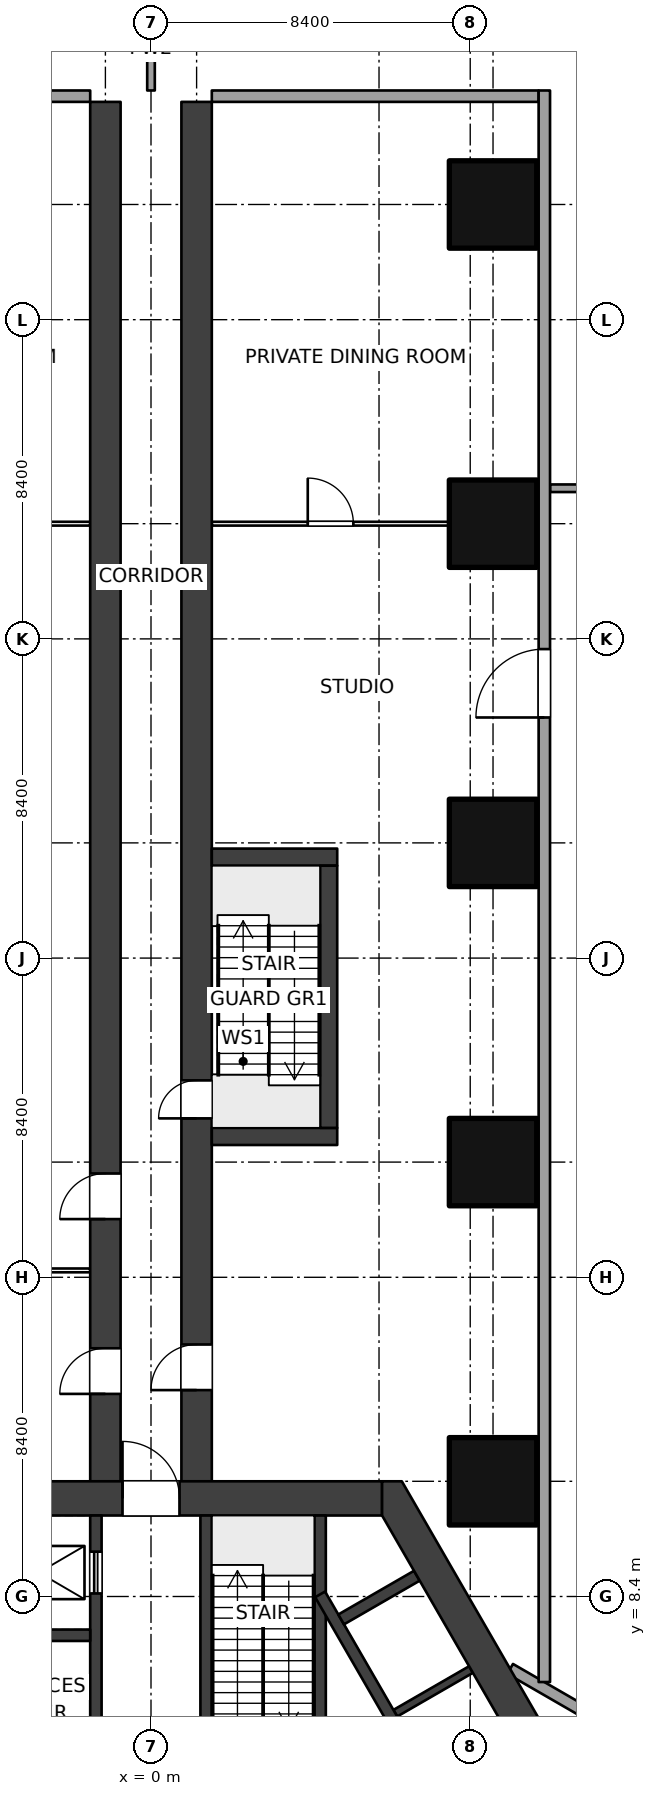
"""IFC4 building model, lengths in metres.
Left out: names, types, materials, properties, quantities, classifications, styles, units other than length and angle.
Written with IfcOpenShell. Run it as: python <this file> out.ifc"""

import sys

from ifc_helpers import new_model, si_unit, direction, frame, frame_2d, origin, origin_2d, place, context, subcontext, project, spatial, polyline, rectangle, outline, extrude, element, fill, save


model = new_model("IFC4")
c1 = context("Model", 3, precision=1e-05, world=origin(), true_north=direction((0.0, 1.0)))
c2 = subcontext(c1, "Body", "Model", "MODEL_VIEW")
j1 = project(units=[si_unit("LENGTHUNIT", "METRE"), si_unit("PLANEANGLEUNIT", "RADIAN")], contexts=[c1])
p1 = place(None, origin())
s1 = spatial("IfcSite", under=j1, at=p1, CompositionType="ELEMENT")
p2 = place(p1, origin())
s2 = spatial("IfcBuilding", under=s1, at=p2, CompositionType="ELEMENT")
p3 = place(p2, frame((0.0, 0.0, 21.0)))
s3 = spatial("IfcBuildingStorey", under=s2, at=p3, CompositionType="ELEMENT", Elevation=21.0)
for number, where, z_axis, x_axis in (
    (1, (9.0, 11.432, 0.0), (0.0, 0.0, 1.0), (1.0, 0.0, 0.0)),
    (2, (9.0, 19.832, 0.0), (0.0, 0.0, 1.0), (1.0, 0.0, 0.0)),
    (3, (9.0, 28.231, 0.0), (0.0, 0.0, 1.0), (1.0, 0.0, 0.0)),
    (4, (9.0, 36.632, 0.0), (0.0, 0.0, 1.0), (1.0, 0.0, 0.0)),
    (5, (9.0, 45.031, 0.0), (0.0, 0.0, 1.0), (1.0, 0.0, 0.0)),
):
    element("IfcColumn", number, at=place(p3, frame(where, z_axis=z_axis, x_axis=x_axis)), inside=s3, PredefinedType="COLUMN", context=c2, shape_type="SweptSolid", body=[
        extrude(rectangle(XDim=2.3, YDim=2.3, at=origin_2d()), origin(), (0.0, 0.0, 1.0), 5.0),
    ])
p4 = place(p3, frame((-6.08, 10.981, 0.0), z_axis=(0.0, 0.0, 1.0), x_axis=(1.0, 0.0, 0.0)))
e6 = element("IfcWall", 6, at=p4, inside=s3, PredefinedType="SHEAR", context=c2, shape_type="SweptSolid", body=[
    extrude(rectangle(XDim=12.161, YDim=0.9, at=frame_2d((6.08, 0.0))), origin(), (0.0, 0.0, 1.0), 5.0),
])
p5 = place(p4, frame((5.33, 0.0, 0.0)))
e7 = element("IfcOpeningElement", 7, at=p5, cuts=e6, PredefinedType="OPENING", context=c2, shape_type="SweptSolid", body=[
    extrude(rectangle(XDim=1.5, YDim=2.1, at=frame_2d((0.75, 1.05))), frame((0.0, 0.46, 0.0), z_axis=(0.0, -1.0, 0.0), x_axis=(1.0, 0.0, 0.0)), (0.0, 0.0, 1.0), 0.92),
])
p6 = place(p3, origin())
e8 = element("IfcWall", 8, at=p6, inside=s3, PredefinedType="SHEAR", context=c2, shape_type="SweptSolid", body=[
    extrude(outline(polyline([(13.2, 0.0), (6.6, 11.432), (6.08, 11.432), (6.08, 10.531), (12.161, 0.0), (12.94, -0.45), (13.2, 0.0)])), origin(), (0.0, 0.0, 1.0), 5.0),
])
p7 = place(p3, frame((1.45, 3.63, 0.0), z_axis=(0.0, 0.0, 1.0), x_axis=(0.0, 1.0, 0.0)))
e9 = element("IfcWall", 9, at=p7, inside=s3, PredefinedType="SHEAR", context=c2, shape_type="SweptSolid", body=[
    extrude(rectangle(XDim=6.902, YDim=0.3, at=frame_2d((3.451, 0.0))), origin(), (0.0, 0.0, 1.0), 5.0),
])
p8 = place(p7, frame((0.25, 0.0, 0.0)))
e10 = element("IfcOpeningElement", 10, at=p8, cuts=e9, PredefinedType="OPENING", context=c2, shape_type="SweptSolid", body=[
    extrude(rectangle(XDim=1.0, YDim=2.1, at=frame_2d((0.5, 1.05))), frame((0.0, 0.16, 0.0), z_axis=(0.0, -1.0, 0.0), x_axis=(1.0, 0.0, 0.0)), (0.0, 0.0, 1.0), 0.32),
])
p9 = place(p3, frame((4.45, 3.63, 0.0), z_axis=(0.0, 0.0, 1.0), x_axis=(0.0, 1.0, 0.0)))
e11 = element("IfcWall", 11, at=p9, inside=s3, PredefinedType="SHEAR", context=c2, shape_type="SweptSolid", body=[
    extrude(rectangle(XDim=6.902, YDim=0.3, at=frame_2d((3.451, 0.0))), origin(), (0.0, 0.0, 1.0), 5.0),
])
p10 = place(p3, frame((-1.45, 3.63, 0.0), z_axis=(0.0, 0.0, 1.0), x_axis=(0.0, 1.0, 0.0)))
e12 = element("IfcWall", 12, at=p10, inside=s3, PredefinedType="SHEAR", context=c2, shape_type="SweptSolid", body=[
    extrude(rectangle(XDim=6.902, YDim=0.3, at=frame_2d((3.451, 0.0))), origin(), (0.0, 0.0, 1.0), 5.0),
])
p11 = place(p10, frame((4.85, 0.0, 0.0)))
e13 = element("IfcOpeningElement", 13, at=p11, cuts=e12, PredefinedType="OPENING", context=c2, shape_type="SweptSolid", body=[
    extrude(rectangle(XDim=1.1, YDim=2.1, at=frame_2d((0.55, 1.05))), frame((0.0, 0.16, 0.0), z_axis=(0.0, -1.0, 0.0), x_axis=(1.0, 0.0, 0.0)), (0.0, 0.0, 1.0), 0.32),
])
p12 = place(p3, frame((-4.3, 7.38, 0.0), z_axis=(0.0, 0.0, 1.0), x_axis=(1.0, 0.0, 0.0)))
e14 = element("IfcWall", 14, at=p12, inside=s3, PredefinedType="SHEAR", context=c2, shape_type="SweptSolid", body=[
    extrude(rectangle(XDim=2.7, YDim=0.3, at=frame_2d((1.35, 0.0))), origin(), (0.0, 0.0, 1.0), 5.0),
])
p13 = place(p3, frame((4.45, 8.455, 0.0), z_axis=(0.0, 0.0, 1.0), x_axis=(0.500002290144, -0.866024081565, 0.0)))
e15 = element("IfcWall", 15, at=p13, inside=s3, PredefinedType="SHEAR", context=c2, shape_type="SweptSolid", body=[
    extrude(rectangle(XDim=10.195, YDim=0.3, at=frame_2d((5.098, 0.0))), origin(), (0.0, 0.0, 1.0), 5.0),
])
p14 = place(p3, frame((5.004, 7.796, 0.0), z_axis=(0.0, 0.0, 1.0), x_axis=(0.866053019151, 0.499952165731, 0.0)))
e16 = element("IfcWall", 16, at=p14, inside=s3, PredefinedType="SHEAR", context=c2, shape_type="SweptSolid", body=[
    extrude(rectangle(XDim=2.3, YDim=0.3, at=frame_2d((1.15, 0.0))), origin(), (0.0, 0.0, 1.0), 5.0),
])
p15 = place(p3, frame((6.429, 5.328, 0.0), z_axis=(0.0, 0.0, 1.0), x_axis=(0.866007057882, 0.500031774688, 0.0)))
e17 = element("IfcWall", 17, at=p15, inside=s3, PredefinedType="SHEAR", context=c2, shape_type="SweptSolid", body=[
    extrude(rectangle(XDim=2.3, YDim=0.2, at=frame_2d((1.15, 0.0))), origin(), (0.0, 0.0, 1.0), 5.0),
])
p16 = place(p3, frame((-1.2, 10.981, 0.0), z_axis=(0.0, 0.0, 1.0), x_axis=(0.0, 1.0, 0.0)))
e18 = element("IfcWall", 18, at=p16, inside=s3, PredefinedType="SHEAR", context=c2, shape_type="SweptSolid", body=[
    extrude(rectangle(XDim=36.75, YDim=0.8, at=frame_2d((18.375, 0.0))), origin(), (0.0, 0.0, 1.0), 5.0),
])
p17 = place(p16, frame((2.75, 0.0, 0.0)))
e19 = element("IfcOpeningElement", 19, at=p17, cuts=e18, PredefinedType="OPENING", context=c2, shape_type="SweptSolid", body=[
    extrude(rectangle(XDim=1.2, YDim=2.1, at=frame_2d((0.6, 1.05))), frame((0.0, 0.41, 0.0), z_axis=(0.0, -1.0, 0.0), x_axis=(1.0, 0.0, 0.0)), (0.0, 0.0, 1.0), 0.82),
])
p18 = place(p16, frame((7.35, 0.0, 0.0)))
e20 = element("IfcOpeningElement", 20, at=p18, cuts=e18, PredefinedType="OPENING", context=c2, shape_type="SweptSolid", body=[
    extrude(rectangle(XDim=1.2, YDim=2.1, at=frame_2d((0.6, 1.05))), frame((0.0, 0.41, 0.0), z_axis=(0.0, -1.0, 0.0), x_axis=(1.0, 0.0, 0.0)), (0.0, 0.0, 1.0), 0.82),
])
p19 = place(p3, frame((1.2, 10.981, 0.0), z_axis=(0.0, 0.0, 1.0), x_axis=(0.0, 1.0, 0.0)))
e21 = element("IfcWall", 21, at=p19, inside=s3, PredefinedType="SHEAR", context=c2, shape_type="SweptSolid", body=[
    extrude(rectangle(XDim=36.75, YDim=0.8, at=frame_2d((18.375, 0.0))), origin(), (0.0, 0.0, 1.0), 5.0),
])
p20 = place(p19, frame((10.0, 0.0, 0.0)))
e22 = element("IfcOpeningElement", 22, at=p20, cuts=e21, PredefinedType="OPENING", context=c2, shape_type="SweptSolid", body=[
    extrude(rectangle(XDim=1.0, YDim=2.1, at=frame_2d((0.5, 1.05))), frame((0.0, 0.41, 0.0), z_axis=(0.0, -1.0, 0.0), x_axis=(1.0, 0.0, 0.0)), (0.0, 0.0, 1.0), 0.82),
])
p21 = place(p19, frame((2.85, 0.0, 0.0)))
e23 = element("IfcOpeningElement", 23, at=p21, cuts=e21, PredefinedType="OPENING", context=c2, shape_type="SweptSolid", body=[
    extrude(rectangle(XDim=1.2, YDim=2.1, at=frame_2d((0.6, 1.05))), frame((0.0, 0.41, 0.0), z_axis=(0.0, -1.0, 0.0), x_axis=(1.0, 0.0, 0.0)), (0.0, 0.0, 1.0), 0.82),
])
p22 = place(p3, frame((-1.6, 16.981, 0.0), z_axis=(0.0, 0.0, 1.0), x_axis=(-1.0, 0.0, 0.0)))
e24 = element("IfcWall", 24, at=p22, inside=s3, PredefinedType="PARTITIONING", context=c2, shape_type="SweptSolid", body=[
    extrude(rectangle(XDim=3.15, YDim=0.1, at=frame_2d((1.575, 0.0))), origin(), (0.0, 0.0, 1.0), 4.6),
])
p23 = place(p3, frame((-1.6, 36.632, 0.0), z_axis=(0.0, 0.0, 1.0), x_axis=(-1.0, 0.0, 0.0)))
e25 = element("IfcWall", 25, at=p23, inside=s3, PredefinedType="PARTITIONING", context=c2, shape_type="SweptSolid", body=[
    extrude(rectangle(XDim=6.25, YDim=0.1, at=frame_2d((3.125, 0.0))), origin(), (0.0, 0.0, 1.0), 2.8),
])
p24 = place(p23, frame((2.525, 0.0, 0.0)))
e26 = element("IfcOpeningElement", 26, at=p24, cuts=e25, PredefinedType="OPENING", context=c2, shape_type="SweptSolid", body=[
    extrude(rectangle(XDim=1.2, YDim=2.1, at=frame_2d((0.6, 1.05))), frame((0.0, 0.06, 0.0), z_axis=(0.0, -1.0, 0.0), x_axis=(1.0, 0.0, 0.0)), (0.0, 0.0, 1.0), 0.12),
])
p25 = place(p3, frame((1.6, 36.632, 0.0), z_axis=(0.0, 0.0, 1.0), x_axis=(1.0, 0.0, 0.0)))
e27 = element("IfcWall", 27, at=p25, inside=s3, PredefinedType="PARTITIONING", context=c2, shape_type="SweptSolid", body=[
    extrude(rectangle(XDim=6.25, YDim=0.1, at=frame_2d((3.125, 0.0))), origin(), (0.0, 0.0, 1.0), 2.8),
])
p26 = place(p25, frame((2.525, 0.0, 0.0)))
e28 = element("IfcOpeningElement", 28, at=p26, cuts=e27, PredefinedType="OPENING", context=c2, shape_type="SweptSolid", body=[
    extrude(rectangle(XDim=1.2, YDim=2.1, at=frame_2d((0.6, 1.05))), frame((0.0, 0.06, 0.0), z_axis=(0.0, -1.0, 0.0), x_axis=(1.0, 0.0, 0.0)), (0.0, 0.0, 1.0), 0.12),
])
p27 = place(p3, frame((0.0, 48.031, 0.0), z_axis=(0.0, 0.0, 1.0), x_axis=(0.0, 1.0, 0.0)))
e29 = element("IfcWall", 29, at=p27, inside=s3, PredefinedType="SOLIDWALL", context=c2, shape_type="SweptSolid", body=[
    extrude(rectangle(XDim=2.176, YDim=0.2, at=frame_2d((1.088, 0.0))), origin(), (0.0, 0.0, 1.0), 4.6),
])
p28 = place(p3, frame((10.5, 37.564, 0.0), z_axis=(0.0, 0.0, 1.0), x_axis=(1.0, 0.0, 0.0)))
e30 = element("IfcWall", 30, at=p28, inside=s3, PredefinedType="SOLIDWALL", context=c2, shape_type="SweptSolid", body=[
    extrude(rectangle(XDim=39.737, YDim=0.2, at=frame_2d((19.869, 0.0))), origin(), (0.0, 0.0, 1.0), 4.6),
])
p29 = place(p28, frame((18.0, 0.0, 0.0)))
e31 = element("IfcOpeningElement", 31, at=p29, cuts=e30, PredefinedType="OPENING", context=c2, shape_type="SweptSolid", body=[
    extrude(rectangle(XDim=1.8, YDim=2.4, at=frame_2d((0.9, 1.2))), frame((0.0, 0.11, 0.0), z_axis=(0.0, -1.0, 0.0), x_axis=(1.0, 0.0, 0.0)), (0.0, 0.0, 1.0), 0.22),
])
for number, where, z_axis, x_axis in (
    (32, (-1.6, 47.882, 0.0), (0.0, 0.0, 1.0), (-1.0, 0.0, 0.0)),
    (33, (1.6, 47.882, 0.0), (0.0, 0.0, 1.0), (1.0, 0.0, 0.0)),
):
    element("IfcWall", number, at=place(p3, frame(where, z_axis=z_axis, x_axis=x_axis)), inside=s3, PredefinedType="SOLIDWALL", context=c2, shape_type="SweptSolid", body=[
        extrude(rectangle(XDim=8.6, YDim=0.3, at=frame_2d((4.3, 0.0))), origin(), (0.0, 0.0, 1.0), 3.0),
    ])
p30 = place(p3, frame((10.35, 6.149, 0.0), z_axis=(0.0, 0.0, 1.0), x_axis=(0.0, 1.0, 0.0)))
e34 = element("IfcWall", 34, at=p30, inside=s3, PredefinedType="SOLIDWALL", context=c2, shape_type="SweptSolid", body=[
    extrude(rectangle(XDim=41.883, YDim=0.3, at=frame_2d((20.941, 0.0))), origin(), (0.0, 0.0, 1.0), 4.6),
])
p31 = place(p30, frame((25.383, 0.0, 0.0)))
e35 = element("IfcOpeningElement", 35, at=p31, cuts=e34, PredefinedType="OPENING", context=c2, shape_type="SweptSolid", body=[
    extrude(rectangle(XDim=1.8, YDim=2.4, at=frame_2d((0.9, 1.2))), frame((0.0, 0.16, 0.0), z_axis=(0.0, -1.0, 0.0), x_axis=(1.0, 0.0, 0.0)), (0.0, 0.0, 1.0), 0.32),
])
p32 = place(p3, frame((9.45, 6.495, 0.0), z_axis=(0.0, 0.0, 1.0), x_axis=(0.866027750123, -0.499995936, 0.0)))
e36 = element("IfcWall", 36, at=p32, inside=s3, PredefinedType="SOLIDWALL", context=c2, shape_type="SweptSolid", body=[
    extrude(rectangle(XDim=29.39, YDim=0.3, at=frame_2d((14.695, 0.0))), origin(), (0.0, 0.0, 1.0), 4.6),
])
p33 = place(p32, frame((18.195, 0.0, 0.0)))
e37 = element("IfcOpeningElement", 37, at=p33, cuts=e36, PredefinedType="OPENING", context=c2, shape_type="SweptSolid", body=[
    extrude(rectangle(XDim=1.8, YDim=2.4, at=frame_2d((0.9, 1.2))), frame((0.0, 0.16, 0.0), z_axis=(0.0, -1.0, 0.0), x_axis=(1.0, 0.0, 0.0)), (0.0, 0.0, 1.0), 0.32),
])
for number, where, z_axis, x_axis in (
    (38, (1.6, 20.507, 0.0), (0.0, 0.0, 1.0), (1.0, 0.0, 0.0)),
    (39, (1.6, 27.856, 0.0), (0.0, 0.0, 1.0), (1.0, 0.0, 0.0)),
):
    element("IfcWall", number, at=place(p3, frame(where, z_axis=z_axis, x_axis=x_axis)), inside=s3, PredefinedType="SOLIDWALL", context=c2, shape_type="SweptSolid", body=[
        extrude(rectangle(XDim=3.3, YDim=0.45, at=frame_2d((1.65, 0.0))), origin(), (0.0, 0.0, 1.0), 5.0),
    ])
p34 = place(p3, frame((4.675, 20.731, 0.0), z_axis=(0.0, 0.0, 1.0), x_axis=(0.0, 1.0, 0.0)))
e40 = element("IfcWall", 40, at=p34, inside=s3, PredefinedType="SOLIDWALL", context=c2, shape_type="SweptSolid", body=[
    extrude(rectangle(XDim=6.9, YDim=0.45, at=frame_2d((3.45, 0.0))), origin(), (0.0, 0.0, 1.0), 5.0),
])
p35 = place(p11, origin())
e41 = element("IfcDoor", 41, at=p35, inside=s3, OperationType="DOUBLE_DOOR_SLIDING", PredefinedType="DOOR", context=c2, shape_type="SweptSolid", body=[
    extrude(rectangle(XDim=1.1, YDim=2.1, at=frame_2d((0.55, 1.05))), frame((0.0, 0.025, 0.0), z_axis=(0.0, -1.0, 0.0), x_axis=(1.0, 0.0, 0.0)), (0.0, 0.0, 1.0), 0.05),
])
fill(e13, e41)
p36 = place(p5, origin())
e42 = element("IfcDoor", 42, at=p36, inside=s3, OperationType="DOUBLE_DOOR_DOUBLE_SWING", PredefinedType="DOOR", context=c2, shape_type="SweptSolid", body=[
    extrude(rectangle(XDim=1.5, YDim=2.1, at=frame_2d((0.75, 1.05))), frame((0.0, 0.025, 0.0), z_axis=(0.0, -1.0, 0.0), x_axis=(1.0, 0.0, 0.0)), (0.0, 0.0, 1.0), 0.05),
])
fill(e7, e42)
p37 = place(p20, origin())
e43 = element("IfcDoor", 43, at=p37, inside=s3, OperationType="SINGLE_SWING_LEFT", PredefinedType="DOOR", context=c2, shape_type="SweptSolid", body=[
    extrude(rectangle(XDim=1.0, YDim=2.1, at=frame_2d((0.5, 1.05))), frame((0.0, 0.025, 0.0), z_axis=(0.0, -1.0, 0.0), x_axis=(1.0, 0.0, 0.0)), (0.0, 0.0, 1.0), 0.05),
])
fill(e22, e43)
p38 = place(p17, origin())
e44 = element("IfcDoor", 44, at=p38, inside=s3, OperationType="DOUBLE_SWING_LEFT", PredefinedType="DOOR", context=c2, shape_type="SweptSolid", body=[
    extrude(rectangle(XDim=1.2, YDim=2.1, at=frame_2d((0.6, 1.05))), frame((0.0, 0.025, 0.0), z_axis=(0.0, -1.0, 0.0), x_axis=(1.0, 0.0, 0.0)), (0.0, 0.0, 1.0), 0.05),
])
fill(e19, e44)
p39 = place(p18, origin())
e45 = element("IfcDoor", 45, at=p39, inside=s3, OperationType="DOUBLE_SWING_LEFT", PredefinedType="DOOR", context=c2, shape_type="SweptSolid", body=[
    extrude(rectangle(XDim=1.2, YDim=2.1, at=frame_2d((0.6, 1.05))), frame((0.0, 0.025, 0.0), z_axis=(0.0, -1.0, 0.0), x_axis=(1.0, 0.0, 0.0)), (0.0, 0.0, 1.0), 0.05),
])
fill(e20, e45)
p40 = place(p26, origin())
e46 = element("IfcDoor", 46, at=p40, inside=s3, OperationType="DOUBLE_SWING_LEFT", PredefinedType="DOOR", context=c2, shape_type="SweptSolid", body=[
    extrude(rectangle(XDim=1.2, YDim=2.1, at=frame_2d((0.6, 1.05))), frame((0.0, 0.025, 0.0), z_axis=(0.0, -1.0, 0.0), x_axis=(1.0, 0.0, 0.0)), (0.0, 0.0, 1.0), 0.05),
])
fill(e28, e46)
p41 = place(p21, origin())
e47 = element("IfcDoor", 47, at=p41, inside=s3, OperationType="DOUBLE_SWING_LEFT", PredefinedType="DOOR", context=c2, shape_type="SweptSolid", body=[
    extrude(rectangle(XDim=1.2, YDim=2.1, at=frame_2d((0.6, 1.05))), frame((0.0, 0.025, 0.0), z_axis=(0.0, -1.0, 0.0), x_axis=(1.0, 0.0, 0.0)), (0.0, 0.0, 1.0), 0.05),
])
fill(e23, e47)
p42 = place(p31, origin())
e48 = element("IfcDoor", 48, at=p42, inside=s3, OperationType="DOUBLE_DOOR_DOUBLE_SWING", PredefinedType="DOOR", context=c2, shape_type="SweptSolid", body=[
    extrude(rectangle(XDim=1.8, YDim=2.4, at=frame_2d((0.9, 1.2))), frame((0.0, 0.025, 0.0), z_axis=(0.0, -1.0, 0.0), x_axis=(1.0, 0.0, 0.0)), (0.0, 0.0, 1.0), 0.05),
])
fill(e35, e48)
save(model, sys.argv[1])
